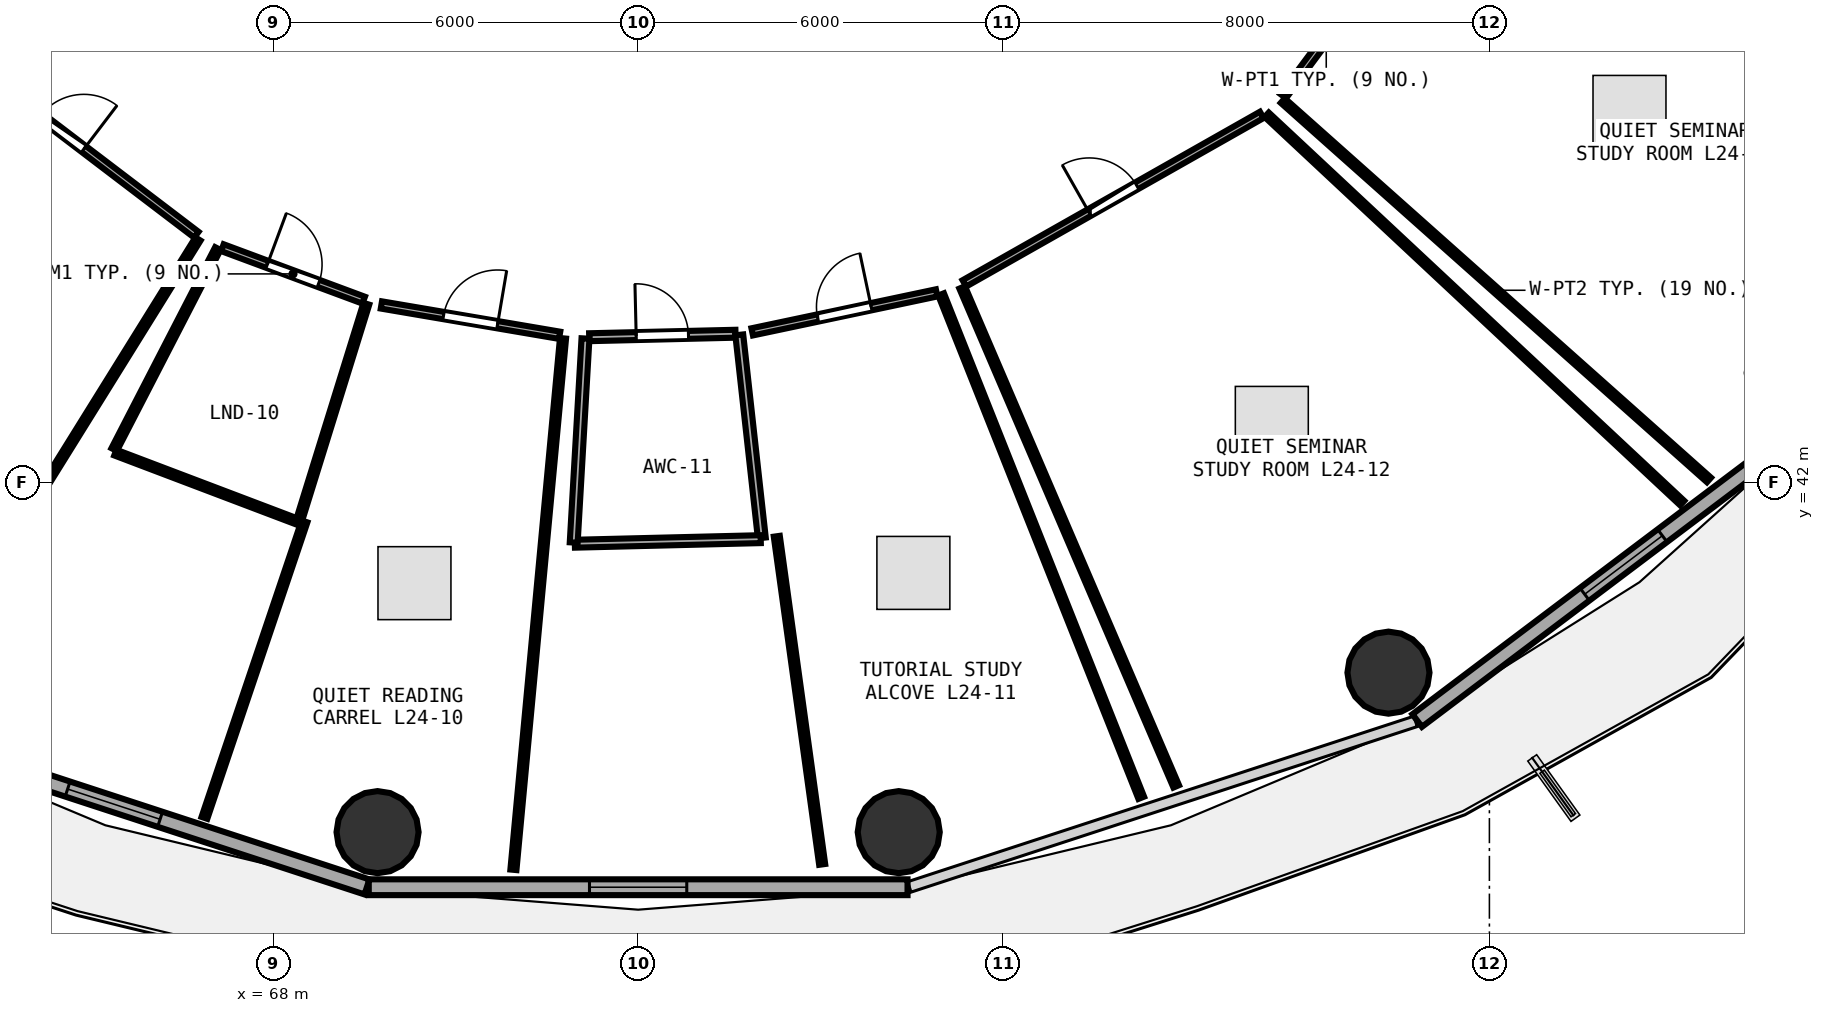
"""IFC4 building model, lengths in metres.
Left out: names, types, materials, properties, quantities, classifications, styles, units other than length and angle.
Written with IfcOpenShell. Run it as: python <this file> out.ifc"""

import sys

from ifc_helpers import new_model, si_unit, direction, frame, frame_2d, origin, origin_2d, place, context, subcontext, project, spatial, rectangle, circle, extrude, element, fill, save


model = new_model("IFC4")
c1 = context("Model", 3, precision=1e-05, world=origin(), true_north=direction((0.0, 1.0)))
c2 = subcontext(c1, "Body", "Model", "MODEL_VIEW")
j1 = project(units=[si_unit("LENGTHUNIT", "METRE"), si_unit("PLANEANGLEUNIT", "RADIAN")], contexts=[c1])
p1 = place(None, origin())
s1 = spatial("IfcSite", under=j1, at=p1, CompositionType="ELEMENT")
p2 = place(p1, origin())
s2 = spatial("IfcBuilding", under=s1, at=p2, CompositionType="ELEMENT")
p3 = place(p2, frame((0.0, 0.0, 95.1)))
s3 = spatial("IfcBuildingStorey", under=s2, at=p3, CompositionType="ELEMENT", Elevation=95.1)
for number, where, z_axis, x_axis in (
    (1, (69.714, 36.255, 0.0), (0.0, 0.0, 1.0), (1.0, 0.0, 0.0)),
    (2, (78.286, 36.255, 0.0), (0.0, 0.0, 1.0), (1.0, 0.0, 0.0)),
    (3, (86.34, 38.878, 0.0), (0.0, 0.0, 1.0), (1.0, 0.0, 0.0)),
):
    element("IfcColumn", number, at=place(p3, frame(where, z_axis=z_axis, x_axis=x_axis)), inside=s3, PredefinedType="COLUMN", context=c2, shape_type="SweptSolid", body=[
        extrude(circle(Radius=0.675, at=origin_2d()), origin(), (0.0, 0.0, 1.0), 3.75),
    ])
p4 = place(p3, frame((61.214, 38.077, 0.0), z_axis=(0.0, 0.0, 1.0), x_axis=(0.950471101963, -0.310812941064, 0.0)))
e4 = element("IfcWall", 4, at=p4, inside=s3, PredefinedType="SOLIDWALL", context=c2, shape_type="SweptSolid", body=[
    extrude(rectangle(XDim=8.76, YDim=0.26, at=frame_2d((4.38, 0.0))), origin(), (0.0, 0.0, 1.0), 3.475),
])
p5 = place(p4, frame((3.58, 0.0, 0.85)))
e5 = element("IfcOpeningElement", 5, at=p5, cuts=e4, PredefinedType="OPENING", context=c2, shape_type="SweptSolid", body=[
    extrude(rectangle(XDim=1.6, YDim=1.45, at=frame_2d((0.8, 0.725))), frame((0.0, 0.14, 0.0), z_axis=(0.0, -1.0, 0.0), x_axis=(1.0, 0.0, 0.0)), (0.0, 0.0, 1.0), 0.28),
])
p6 = place(p3, frame((69.57, 35.349, 0.0), z_axis=(0.0, 0.0, 1.0), x_axis=(1.0, 0.0, 0.0)))
e6 = element("IfcWall", 6, at=p6, inside=s3, PredefinedType="SOLIDWALL", context=c2, shape_type="SweptSolid", body=[
    extrude(rectangle(XDim=8.861, YDim=0.26, at=frame_2d((4.43, 0.0))), origin(), (0.0, 0.0, 1.0), 3.475),
])
p7 = place(p6, frame((3.63, 0.0, 0.85)))
e7 = element("IfcOpeningElement", 7, at=p7, cuts=e6, PredefinedType="OPENING", context=c2, shape_type="SweptSolid", body=[
    extrude(rectangle(XDim=1.6, YDim=1.45, at=frame_2d((0.8, 0.725))), frame((0.0, 0.14, 0.0), z_axis=(0.0, -1.0, 0.0), x_axis=(1.0, 0.0, 0.0)), (0.0, 0.0, 1.0), 0.28),
])
p8 = place(p3, frame((86.812, 38.09, 0.0), z_axis=(0.0, 0.0, 1.0), x_axis=(0.798501507879, 0.601992808857, 0.0)))
e8 = element("IfcWall", 8, at=p8, inside=s3, PredefinedType="SOLIDWALL", context=c2, shape_type="SweptSolid", body=[
    extrude(rectangle(XDim=8.499, YDim=0.26, at=frame_2d((4.25, 0.0))), origin(), (0.0, 0.0, 1.0), 3.475),
])
p9 = place(p8, frame((3.45, 0.0, 0.85)))
e9 = element("IfcOpeningElement", 9, at=p9, cuts=e8, PredefinedType="OPENING", context=c2, shape_type="SweptSolid", body=[
    extrude(rectangle(XDim=1.6, YDim=1.45, at=frame_2d((0.8, 0.725))), frame((0.0, 0.14, 0.0), z_axis=(0.0, -1.0, 0.0), x_axis=(1.0, 0.0, 0.0)), (0.0, 0.0, 1.0), 0.28),
])
p10 = place(p3, frame((62.318, 49.442, 0.0), z_axis=(0.0, 0.0, 1.0), x_axis=(0.795762794985, -0.605608432997, 0.0)))
e10 = element("IfcWall", 10, at=p10, inside=s3, PredefinedType="PARTITIONING", context=c2, shape_type="SweptSolid", body=[
    extrude(rectangle(XDim=5.55, YDim=0.12, at=frame_2d((2.775, 0.0))), origin(), (0.0, 0.0, 1.0), 2.925),
])
p11 = place(p10, frame((2.325, 0.0, 0.0)))
e11 = element("IfcOpeningElement", 11, at=p11, cuts=e10, PredefinedType="OPENING", context=c2, shape_type="SweptSolid", body=[
    extrude(rectangle(XDim=0.9, YDim=2.08, at=frame_2d((0.45, 1.04))), frame((0.0, 0.07, 0.0), z_axis=(0.0, -1.0, 0.0), x_axis=(1.0, 0.0, 0.0)), (0.0, 0.0, 1.0), 0.14),
])
p12 = place(p3, frame((67.162, 45.867, 0.0), z_axis=(0.0, 0.0, 1.0), x_axis=(0.937401389833, -0.348250821018, 0.0)))
e12 = element("IfcWall", 12, at=p12, inside=s3, PredefinedType="PARTITIONING", context=c2, shape_type="SweptSolid", body=[
    extrude(rectangle(XDim=2.479, YDim=0.12, at=frame_2d((1.24, 0.0))), origin(), (0.0, 0.0, 1.0), 2.925),
])
p13 = place(p12, frame((0.789, 0.0, 0.0)))
e13 = element("IfcOpeningElement", 13, at=p13, cuts=e12, PredefinedType="OPENING", context=c2, shape_type="SweptSolid", body=[
    extrude(rectangle(XDim=0.9, YDim=2.08, at=frame_2d((0.45, 1.04))), frame((0.0, 0.07, 0.0), z_axis=(0.0, -1.0, 0.0), x_axis=(1.0, 0.0, 0.0)), (0.0, 0.0, 1.0), 0.14),
])
p14 = place(p3, frame((69.777, 44.925, 0.0), z_axis=(0.0, 0.0, 1.0), x_axis=(0.985835901267, -0.167712777608, 0.0)))
e14 = element("IfcWall", 14, at=p14, inside=s3, PredefinedType="PARTITIONING", context=c2, shape_type="SweptSolid", body=[
    extrude(rectangle(XDim=2.974, YDim=0.12, at=frame_2d((1.487, 0.0))), origin(), (0.0, 0.0, 1.0), 3.48),
])
p15 = place(p14, frame((1.037, 0.0, 0.0)))
e15 = element("IfcOpeningElement", 15, at=p15, cuts=e14, PredefinedType="OPENING", context=c2, shape_type="SweptSolid", body=[
    extrude(rectangle(XDim=0.9, YDim=2.08, at=frame_2d((0.45, 1.04))), frame((0.0, 0.07, 0.0), z_axis=(0.0, -1.0, 0.0), x_axis=(1.0, 0.0, 0.0)), (0.0, 0.0, 1.0), 0.14),
])
p16 = place(p3, frame((73.195, 44.394, 0.0), z_axis=(0.0, 0.0, 1.0), x_axis=(0.999715810971, 0.023838986867, 0.0)))
e16 = element("IfcWall", 16, at=p16, inside=s3, PredefinedType="PLUMBINGWALL", context=c2, shape_type="SweptSolid", body=[
    extrude(rectangle(XDim=2.407, YDim=0.13, at=frame_2d((1.203, 0.0))), origin(), (0.0, 0.0, 1.0), 3.48),
])
p17 = place(p16, frame((0.773, 0.0, 0.0)))
e17 = element("IfcOpeningElement", 17, at=p17, cuts=e16, PredefinedType="OPENING", context=c2, shape_type="SweptSolid", body=[
    extrude(rectangle(XDim=0.86, YDim=2.05, at=frame_2d((0.43, 1.025))), frame((0.0, 0.075, 0.0), z_axis=(0.0, -1.0, 0.0), x_axis=(1.0, 0.0, 0.0)), (0.0, 0.0, 1.0), 0.15),
])
p18 = place(p3, frame((75.876, 44.482, 0.0), z_axis=(0.0, 0.0, 1.0), x_axis=(0.978387400111, 0.206780306856, 0.0)))
e18 = element("IfcWall", 18, at=p18, inside=s3, PredefinedType="PARTITIONING", context=c2, shape_type="SweptSolid", body=[
    extrude(rectangle(XDim=3.1, YDim=0.12, at=frame_2d((1.55, 0.0))), origin(), (0.0, 0.0, 1.0), 3.48),
])
p19 = place(p18, frame((1.1, 0.0, 0.0)))
e19 = element("IfcOpeningElement", 19, at=p19, cuts=e18, PredefinedType="OPENING", context=c2, shape_type="SweptSolid", body=[
    extrude(rectangle(XDim=0.9, YDim=2.08, at=frame_2d((0.45, 1.04))), frame((0.0, 0.07, 0.0), z_axis=(0.0, -1.0, 0.0), x_axis=(1.0, 0.0, 0.0)), (0.0, 0.0, 1.0), 0.14),
])
p20 = place(p3, frame((79.365, 45.28, 0.0), z_axis=(0.0, 0.0, 1.0), x_axis=(0.870068136537, 0.49293147372, 0.0)))
e20 = element("IfcWall", 20, at=p20, inside=s3, PredefinedType="PARTITIONING", context=c2, shape_type="SweptSolid", body=[
    extrude(rectangle(XDim=5.621, YDim=0.12, at=frame_2d((2.811, 0.0))), origin(), (0.0, 0.0, 1.0), 2.925),
])
p21 = place(p20, frame((2.36, 0.0, 0.0)))
e21 = element("IfcOpeningElement", 21, at=p21, cuts=e20, PredefinedType="OPENING", context=c2, shape_type="SweptSolid", body=[
    extrude(rectangle(XDim=0.9, YDim=2.08, at=frame_2d((0.45, 1.04))), frame((0.0, 0.07, 0.0), z_axis=(0.0, -1.0, 0.0), x_axis=(1.0, 0.0, 0.0)), (0.0, 0.0, 1.0), 0.14),
])
p22 = place(p3, frame((84.608, 48.36, 0.0), z_axis=(0.0, 0.0, 1.0), x_axis=(0.596833425992, 0.802365167251, 0.0)))
e22 = element("IfcWall", 22, at=p22, inside=s3, PredefinedType="PARTITIONING", context=c2, shape_type="SweptSolid", body=[
    extrude(rectangle(XDim=5.399, YDim=0.12, at=frame_2d((2.699, 0.0))), origin(), (0.0, 0.0, 1.0), 2.925),
])
p23 = place(p22, frame((2.249, 0.0, 0.0)))
e23 = element("IfcOpeningElement", 23, at=p23, cuts=e22, PredefinedType="OPENING", context=c2, shape_type="SweptSolid", body=[
    extrude(rectangle(XDim=0.9, YDim=2.08, at=frame_2d((0.45, 1.04))), frame((0.0, 0.07, 0.0), z_axis=(0.0, -1.0, 0.0), x_axis=(1.0, 0.0, 0.0)), (0.0, 0.0, 1.0), 0.14),
])
p24 = place(p3, frame((66.761, 46.01, 0.0), z_axis=(0.0, 0.0, 1.0), x_axis=(-0.528015738644, -0.849234584638, 0.0)))
e24 = element("IfcWall", 24, at=p24, inside=s3, PredefinedType="PARTITIONING", context=c2, shape_type="SweptSolid", body=[
    extrude(rectangle(XDim=8.338, YDim=0.1, at=frame_2d((4.169, 0.0))), origin(), (0.0, 0.0, 1.0), 3.175),
])
p25 = place(p3, frame((69.53, 44.945, 0.0), z_axis=(0.0, 0.0, 1.0), x_axis=(-0.296510682072, -0.955029536411, 0.0)))
e25 = element("IfcWall", 25, at=p25, inside=s3, PredefinedType="PARTITIONING", context=c2, shape_type="SweptSolid", body=[
    extrude(rectangle(XDim=3.72, YDim=0.1, at=frame_2d((1.86, 0.0))), origin(), (0.0, 0.0, 1.0), 2.925),
])
p26 = place(p3, frame((68.378, 41.368, 0.0), z_axis=(0.0, 0.0, 1.0), x_axis=(-0.935027341219, 0.354575621233, 0.0)))
e26 = element("IfcWall", 26, at=p26, inside=s3, PredefinedType="PARTITIONING", context=c2, shape_type="SweptSolid", body=[
    extrude(rectangle(XDim=3.183, YDim=0.1, at=frame_2d((1.592, 0.0))), origin(), (0.0, 0.0, 1.0), 2.925),
])
p27 = place(p3, frame((65.382, 42.546, 0.0), z_axis=(0.0, 0.0, 1.0), x_axis=(0.458413879464, 0.888738834031, 0.0)))
e27 = element("IfcWall", 27, at=p27, inside=s3, PredefinedType="PARTITIONING", context=c2, shape_type="SweptSolid", body=[
    extrude(rectangle(XDim=3.72, YDim=0.1, at=frame_2d((1.86, 0.0))), origin(), (0.0, 0.0, 1.0), 3.175),
])
p28 = place(p3, frame((72.764, 44.376, 0.0), z_axis=(0.0, 0.0, 1.0), x_axis=(-0.092917687898, -0.995673793607, 0.0)))
e28 = element("IfcWall", 28, at=p28, inside=s3, PredefinedType="PARTITIONING", context=c2, shape_type="SweptSolid", body=[
    extrude(rectangle(XDim=8.779, YDim=0.1, at=frame_2d((4.389, 0.0))), origin(), (0.0, 0.0, 1.0), 2.975),
])
p29 = place(p3, frame((66.867, 36.49, 0.0), z_axis=(0.0, 0.0, 1.0), x_axis=(0.319911741109, 0.947447348353, 0.0)))
e29 = element("IfcWall", 29, at=p29, inside=s3, PredefinedType="PARTITIONING", context=c2, shape_type="SweptSolid", body=[
    extrude(rectangle(XDim=5.146, YDim=0.1, at=frame_2d((2.573, 0.0))), origin(), (0.0, 0.0, 1.0), 2.925),
])
p30 = place(p3, frame((75.663, 44.433, 0.0), z_axis=(0.0, 0.0, 1.0), x_axis=(0.110311886913, -0.993897020624, 0.0)))
e30 = element("IfcWall", 30, at=p30, inside=s3, PredefinedType="PLUMBINGWALL", context=c2, shape_type="SweptSolid", body=[
    extrude(rectangle(XDim=3.36, YDim=0.13, at=frame_2d((1.68, 0.0))), origin(), (0.0, 0.0, 1.0), 3.175),
])
p31 = place(p3, frame((76.016, 41.073, 0.0), z_axis=(0.0, 0.0, 1.0), x_axis=(-0.999699597441, -0.024509485419, 0.0)))
e31 = element("IfcWall", 31, at=p31, inside=s3, PredefinedType="PLUMBINGWALL", context=c2, shape_type="SweptSolid", body=[
    extrude(rectangle(XDim=3.058, YDim=0.13, at=frame_2d((1.529, 0.0))), origin(), (0.0, 0.0, 1.0), 3.48),
])
p32 = place(p3, frame((72.94, 41.018, 0.0), z_axis=(0.0, 0.0, 1.0), x_axis=(0.057610459658, 0.998339138238, 0.0)))
e32 = element("IfcWall", 32, at=p32, inside=s3, PredefinedType="PLUMBINGWALL", context=c2, shape_type="SweptSolid", body=[
    extrude(rectangle(XDim=3.361, YDim=0.13, at=frame_2d((1.68, 0.0))), origin(), (0.0, 0.0, 1.0), 3.175),
])
p33 = place(p3, frame((78.983, 45.099, 0.0), z_axis=(0.0, 0.0, 1.0), x_axis=(0.369438475108, -0.929255192673, 0.0)))
e33 = element("IfcWall", 33, at=p33, inside=s3, PredefinedType="PARTITIONING", context=c2, shape_type="SweptSolid", body=[
    extrude(rectangle(XDim=8.909, YDim=0.1, at=frame_2d((4.455, 0.0))), origin(), (0.0, 0.0, 1.0), 2.925),
])
p34 = place(p3, frame((77.027, 35.725, 0.0), z_axis=(0.0, 0.0, 1.0), x_axis=(-0.136996790132, 0.990571491359, 0.0)))
e34 = element("IfcWall", 34, at=p34, inside=s3, PredefinedType="PARTITIONING", context=c2, shape_type="SweptSolid", body=[
    extrude(rectangle(XDim=5.448, YDim=0.1, at=frame_2d((2.724, 0.0))), origin(), (0.0, 0.0, 1.0), 2.975),
])
p35 = place(p3, frame((84.337, 48.053, 0.0), z_axis=(0.0, 0.0, 1.0), x_axis=(0.730663657097, -0.682737592489, 0.0)))
e35 = element("IfcWall", 35, at=p35, inside=s3, PredefinedType="PARTITIONING", context=c2, shape_type="SweptSolid", body=[
    extrude(rectangle(XDim=9.353, YDim=0.1, at=frame_2d((4.676, 0.0))), origin(), (0.0, 0.0, 1.0), 2.975),
])
p36 = place(p3, frame((82.849, 37.008, 0.0), z_axis=(0.0, 0.0, 1.0), x_axis=(-0.394269081074, 0.918995044442, 0.0)))
e36 = element("IfcWall", 36, at=p36, inside=s3, PredefinedType="PARTITIONING", context=c2, shape_type="SweptSolid", body=[
    extrude(rectangle(XDim=8.928, YDim=0.1, at=frame_2d((4.464, 0.0))), origin(), (0.0, 0.0, 1.0), 2.925),
])
p37 = place(p3, frame((91.611, 42.048, 0.0), z_axis=(0.0, 0.0, 1.0), x_axis=(-0.747021589751, 0.664799777713, 0.0)))
e37 = element("IfcWall", 37, at=p37, inside=s3, PredefinedType="PARTITIONING", context=c2, shape_type="SweptSolid", body=[
    extrude(rectangle(XDim=9.383, YDim=0.1, at=frame_2d((4.691, 0.0))), origin(), (0.0, 0.0, 1.0), 2.975),
])
p38 = place(p5, origin())
e38 = element("IfcWindow", 38, at=p38, inside=s3, PartitioningType="SINGLE_PANEL", PredefinedType="WINDOW", context=c2, shape_type="SweptSolid", body=[
    extrude(rectangle(XDim=1.6, YDim=1.45, at=frame_2d((0.8, 0.725))), frame((0.0, 0.03, 0.0), z_axis=(0.0, -1.0, 0.0), x_axis=(1.0, 0.0, 0.0)), (0.0, 0.0, 1.0), 0.06),
])
fill(e5, e38)
p39 = place(p7, origin())
e39 = element("IfcWindow", 39, at=p39, inside=s3, PartitioningType="SINGLE_PANEL", PredefinedType="WINDOW", context=c2, shape_type="SweptSolid", body=[
    extrude(rectangle(XDim=1.6, YDim=1.45, at=frame_2d((0.8, 0.725))), frame((0.0, 0.03, 0.0), z_axis=(0.0, -1.0, 0.0), x_axis=(1.0, 0.0, 0.0)), (0.0, 0.0, 1.0), 0.06),
])
fill(e7, e39)
p40 = place(p9, origin())
e40 = element("IfcWindow", 40, at=p40, inside=s3, PartitioningType="SINGLE_PANEL", PredefinedType="WINDOW", context=c2, shape_type="SweptSolid", body=[
    extrude(rectangle(XDim=1.6, YDim=1.45, at=frame_2d((0.8, 0.725))), frame((0.0, 0.03, 0.0), z_axis=(0.0, -1.0, 0.0), x_axis=(1.0, 0.0, 0.0)), (0.0, 0.0, 1.0), 0.06),
])
fill(e9, e40)
p41 = place(p11, origin())
e41 = element("IfcDoor", 41, at=p41, inside=s3, OperationType="SINGLE_SWING_RIGHT", PredefinedType="DOOR", context=c2, shape_type="SweptSolid", body=[
    extrude(rectangle(XDim=0.9, YDim=2.08, at=frame_2d((0.45, 1.04))), frame((0.0, 0.025, 0.0), z_axis=(0.0, -1.0, 0.0), x_axis=(1.0, 0.0, 0.0)), (0.0, 0.0, 1.0), 0.05),
])
fill(e11, e41)
p42 = place(p13, origin())
e42 = element("IfcDoor", 42, at=p42, inside=s3, OperationType="SINGLE_SWING_LEFT", PredefinedType="DOOR", context=c2, shape_type="SweptSolid", body=[
    extrude(rectangle(XDim=0.9, YDim=2.08, at=frame_2d((0.45, 1.04))), frame((0.0, 0.025, 0.0), z_axis=(0.0, -1.0, 0.0), x_axis=(1.0, 0.0, 0.0)), (0.0, 0.0, 1.0), 0.05),
])
fill(e13, e42)
p43 = place(p15, origin())
e43 = element("IfcDoor", 43, at=p43, inside=s3, OperationType="SINGLE_SWING_RIGHT", PredefinedType="DOOR", context=c2, shape_type="SweptSolid", body=[
    extrude(rectangle(XDim=0.9, YDim=2.08, at=frame_2d((0.45, 1.04))), frame((0.0, 0.025, 0.0), z_axis=(0.0, -1.0, 0.0), x_axis=(1.0, 0.0, 0.0)), (0.0, 0.0, 1.0), 0.05),
])
fill(e15, e43)
p44 = place(p17, origin())
e44 = element("IfcDoor", 44, at=p44, inside=s3, OperationType="SINGLE_SWING_LEFT", PredefinedType="DOOR", context=c2, shape_type="SweptSolid", body=[
    extrude(rectangle(XDim=0.86, YDim=2.05, at=frame_2d((0.43, 1.025))), frame((0.0, 0.025, 0.0), z_axis=(0.0, -1.0, 0.0), x_axis=(1.0, 0.0, 0.0)), (0.0, 0.0, 1.0), 0.05),
])
fill(e17, e44)
p45 = place(p19, origin())
e45 = element("IfcDoor", 45, at=p45, inside=s3, OperationType="SINGLE_SWING_RIGHT", PredefinedType="DOOR", context=c2, shape_type="SweptSolid", body=[
    extrude(rectangle(XDim=0.9, YDim=2.08, at=frame_2d((0.45, 1.04))), frame((0.0, 0.025, 0.0), z_axis=(0.0, -1.0, 0.0), x_axis=(1.0, 0.0, 0.0)), (0.0, 0.0, 1.0), 0.05),
])
fill(e19, e45)
p46 = place(p21, origin())
e46 = element("IfcDoor", 46, at=p46, inside=s3, OperationType="SINGLE_SWING_LEFT", PredefinedType="DOOR", context=c2, shape_type="SweptSolid", body=[
    extrude(rectangle(XDim=0.9, YDim=2.08, at=frame_2d((0.45, 1.04))), frame((0.0, 0.025, 0.0), z_axis=(0.0, -1.0, 0.0), x_axis=(1.0, 0.0, 0.0)), (0.0, 0.0, 1.0), 0.05),
])
fill(e21, e46)
save(model, sys.argv[1])
